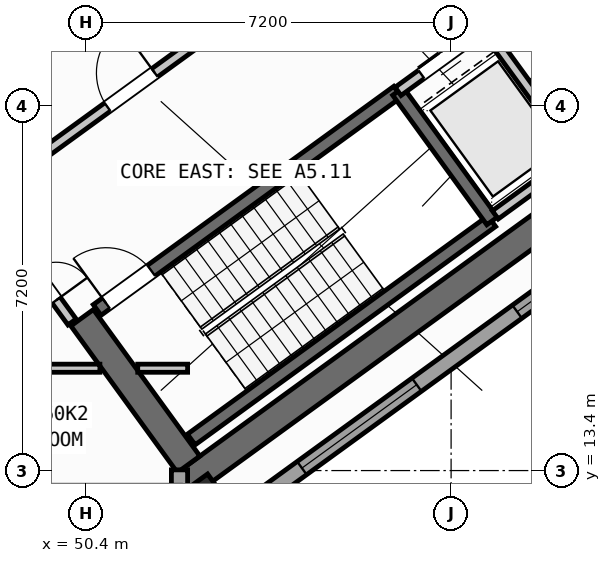
"""IFC4 building model, lengths in metres.
Left out: names, types, materials, properties, quantities, classifications, styles, units other than length and angle.
Written with IfcOpenShell. Run it as: python <this file> out.ifc"""

import sys

from ifc_helpers import new_model, si_unit, direction, frame, frame_2d, origin, origin_2d, place, context, subcontext, project, spatial, rectangle, hollow_rectangle, extrude, source, transform, mapped, element, fill, save


model = new_model("IFC4")
c1 = context("Model", 3, precision=1e-05, world=origin(), true_north=direction((0.0, 1.0)))
c2 = subcontext(c1, "Body", "Model", "MODEL_VIEW")
j1 = project(units=[si_unit("LENGTHUNIT", "METRE"), si_unit("PLANEANGLEUNIT", "RADIAN")], contexts=[c1])
p1 = place(None, origin())
s1 = spatial("IfcSite", under=j1, at=p1, CompositionType="ELEMENT")
p2 = place(p1, origin())
s2 = spatial("IfcBuilding", under=s1, at=p2, CompositionType="ELEMENT")
p3 = place(p2, frame((0.0, 0.0, 199.5)))
s3 = spatial("IfcBuildingStorey", under=s2, at=p3, CompositionType="ELEMENT", Elevation=199.5)
p4 = place(p3, frame((52.359, 13.14, 0.0), z_axis=(0.0, 0.0, 1.0), x_axis=(0.809014896919, 0.587788139183, 0.0)))
e1 = element("IfcWall", 1, at=p4, inside=s3, PredefinedType="SHEAR", context=c2, shape_type="SweptSolid", body=[
    extrude(rectangle(XDim=12.34, YDim=0.55, at=frame_2d((6.17, 0.0))), origin(), (0.0, 0.0, 1.0), 4.25),
])
p5 = place(p3, frame((52.42, 13.524, 0.0), z_axis=(0.0, 0.0, 1.0), x_axis=(-0.587802113096, 0.809004744015, 0.0)))
e2 = element("IfcWall", 2, at=p5, inside=s3, PredefinedType="SHEAR", context=c2, shape_type="SweptSolid", body=[
    extrude(rectangle(XDim=3.575, YDim=0.55, at=frame_2d((1.788, 0.0))), origin(), (0.0, 0.0, 1.0), 4.25),
])
m1 = source(origin(), c2, "Body", "SweptSolid", [
    extrude(hollow_rectangle(XDim=0.8, YDim=0.8, WallThickness=0.032, at=origin_2d()), origin(), (0.0, 0.0, 1.0), 4.5),
])
p6 = place(p3, frame((52.705, 12.773, 0.0), z_axis=(0.0, 0.0, 1.0), x_axis=(0.809016994375, 0.587785252292, 0.0)))
e3 = element("IfcColumn", 3, at=p6, inside=s3, PredefinedType="COLUMN", context=c2, shape_type="MappedRepresentation", body=[
    mapped(m1, transform((0.0, 0.0, 0.0), scale=1.0)),
])
p7 = place(p3, frame((67.454, 22.747, 0.0), z_axis=(0.0, 0.0, 1.0), x_axis=(-0.809021120468, -0.587779573171, 0.0)))
e4 = element("IfcWall", 4, at=p7, inside=s3, PredefinedType="STANDARD", context=c2, shape_type="SweptSolid", body=[
    extrude(rectangle(XDim=17.588, YDim=0.32, at=frame_2d((8.794, 0.0))), origin(), (0.0, 0.0, 1.0), 4.25),
])
p8 = place(p7, frame((1.624, 0.0, 0.0)))
e5 = element("IfcOpeningElement", 5, at=p8, cuts=e4, PredefinedType="OPENING", context=c2, shape_type="SweptSolid", body=[
    extrude(rectangle(XDim=1.05, YDim=2.15, at=frame_2d((0.525, 1.075))), frame((0.0, 0.17, 0.0), z_axis=(0.0, -1.0, 0.0), x_axis=(1.0, 0.0, 0.0)), (0.0, 0.0, 1.0), 0.34),
])
p9 = place(p7, frame((7.769, 0.0, 0.65)))
e6 = element("IfcOpeningElement", 6, at=p9, cuts=e4, PredefinedType="OPENING", context=c2, shape_type="SweptSolid", body=[
    extrude(rectangle(XDim=2.8, YDim=2.1, at=frame_2d((1.4, 1.05))), frame((0.0, 0.17, 0.0), z_axis=(0.0, -1.0, 0.0), x_axis=(1.0, 0.0, 0.0)), (0.0, 0.0, 1.0), 0.34),
])
p10 = place(p7, frame((13.019, 0.0, 0.65)))
e7 = element("IfcOpeningElement", 7, at=p10, cuts=e4, PredefinedType="OPENING", context=c2, shape_type="SweptSolid", body=[
    extrude(rectangle(XDim=2.8, YDim=2.1, at=frame_2d((1.4, 1.05))), frame((0.0, 0.17, 0.0), z_axis=(0.0, -1.0, 0.0), x_axis=(1.0, 0.0, 0.0)), (0.0, 0.0, 1.0), 0.34),
])
p11 = place(p3, frame((52.24, 13.414, 0.0), z_axis=(0.0, 0.0, 1.0), x_axis=(0.0, -1.0, 0.0)))
e8 = element("IfcWall", 8, at=p11, inside=s3, PredefinedType="STANDARD", context=c2, shape_type="SweptSolid", body=[
    extrude(rectangle(XDim=9.948, YDim=0.32, at=frame_2d((4.974, 0.0))), origin(), (0.0, 0.0, 1.0), 4.25),
])
p12 = place(p11, frame((1.917, 0.0, 0.65)))
e9 = element("IfcOpeningElement", 9, at=p12, cuts=e8, PredefinedType="OPENING", context=c2, shape_type="SweptSolid", body=[
    extrude(rectangle(XDim=2.8, YDim=2.1, at=frame_2d((1.4, 1.05))), frame((0.0, 0.17, 0.0), z_axis=(0.0, -1.0, 0.0), x_axis=(1.0, 0.0, 0.0)), (0.0, 0.0, 1.0), 0.34),
])
p13 = place(p11, frame((6.883, 0.0, 0.8)))
e10 = element("IfcOpeningElement", 10, at=p13, cuts=e8, PredefinedType="OPENING", context=c2, shape_type="SweptSolid", body=[
    extrude(rectangle(XDim=2.1, YDim=1.55, at=frame_2d((1.05, 0.775))), frame((0.0, 0.17, 0.0), z_axis=(0.0, -1.0, 0.0), x_axis=(1.0, 0.0, 0.0)), (0.0, 0.0, 1.0), 0.34),
])
p14 = place(p3, frame((52.472, 14.013, 0.0), z_axis=(0.0, 0.0, 1.0), x_axis=(0.809028366311, 0.587769599847, 0.0)))
e11 = element("IfcWall", 11, at=p14, inside=s3, PredefinedType="SHEAR", context=c2, shape_type="SweptSolid", body=[
    extrude(rectangle(XDim=7.33, YDim=0.26, at=frame_2d((3.665, 0.0))), origin(), (0.0, 0.0, 1.0), 4.25),
])
p15 = place(p3, frame((50.615, 16.57, 0.0), z_axis=(0.0, 0.0, 1.0), x_axis=(0.809028366311, 0.587769599847, 0.0)))
e12 = element("IfcWall", 12, at=p15, inside=s3, PredefinedType="SHEAR", context=c2, shape_type="SweptSolid", body=[
    extrude(rectangle(XDim=7.33, YDim=0.26, at=frame_2d((3.665, 0.0))), origin(), (0.0, 0.0, 1.0), 4.25),
])
p16 = place(p15, frame((0.22, 0.0, 0.0)))
e13 = element("IfcOpeningElement", 13, at=p16, cuts=e12, PredefinedType="OPENING", context=c2, shape_type="SweptSolid", body=[
    extrude(rectangle(XDim=1.1, YDim=2.1, at=frame_2d((0.55, 1.05))), frame((0.0, 0.14, 0.0), z_axis=(0.0, -1.0, 0.0), x_axis=(1.0, 0.0, 0.0)), (0.0, 0.0, 1.0), 0.28),
])
p17 = place(p3, frame((58.41, 18.327, 0.0), z_axis=(0.0, 0.0, 1.0), x_axis=(-0.58776738483, 0.809029975545, 0.0)))
e14 = element("IfcWall", 14, at=p17, inside=s3, PredefinedType="SHEAR", context=c2, shape_type="SweptSolid", body=[
    extrude(rectangle(XDim=3.16, YDim=0.26, at=frame_2d((1.58, 0.0))), origin(), (0.0, 0.0, 1.0), 4.25),
])
p18 = place(p3, frame((47.065, 21.407, 0.0), z_axis=(0.0, 0.0, 1.0), x_axis=(0.809032984992, 0.587763242466, 0.0)))
e15 = element("IfcWall", 15, at=p18, inside=s3, PredefinedType="STANDARD", context=c2, shape_type="SweptSolid", body=[
    extrude(rectangle(XDim=3.448, YDim=0.2, at=frame_2d((1.724, 0.0))), origin(), (0.0, 0.0, 1.0), 4.24),
])
p19 = place(p18, frame((0.458, 0.0, 0.0)))
e16 = element("IfcOpeningElement", 16, at=p19, cuts=e15, PredefinedType="OPENING", context=c2, shape_type="SweptSolid", body=[
    extrude(rectangle(XDim=1.3, YDim=2.2, at=frame_2d((0.65, 1.1))), frame((0.0, 0.11, 0.0), z_axis=(0.0, -1.0, 0.0), x_axis=(1.0, 0.0, 0.0)), (0.0, 0.0, 1.0), 0.22),
])
p20 = place(p3, frame((48.758, 19.077, 0.0), z_axis=(0.0, 0.0, 1.0), x_axis=(0.809005065155, 0.587801671104, 0.0)))
e17 = element("IfcWall", 17, at=p20, inside=s3, PredefinedType="STANDARD", context=c2, shape_type="SweptSolid", body=[
    extrude(rectangle(XDim=5.768, YDim=0.2, at=frame_2d((2.884, 0.0))), origin(), (0.0, 0.0, 1.0), 4.24),
])
p21 = place(p20, frame((2.548, 0.0, 0.0)))
e18 = element("IfcOpeningElement", 18, at=p21, cuts=e17, PredefinedType="OPENING", context=c2, shape_type="SweptSolid", body=[
    extrude(rectangle(XDim=1.15, YDim=2.1, at=frame_2d((0.575, 1.05))), frame((0.0, 0.11, 0.0), z_axis=(0.0, -1.0, 0.0), x_axis=(1.0, 0.0, 0.0)), (0.0, 0.0, 1.0), 0.22),
])
p22 = place(p3, frame((56.553, 20.884, 0.0), z_axis=(0.0, 0.0, 1.0), x_axis=(0.809023564264, 0.58777620951, 0.0)))
e19 = element("IfcWall", 19, at=p22, inside=s3, PredefinedType="STANDARD", context=c2, shape_type="SweptSolid", body=[
    extrude(rectangle(XDim=3.818, YDim=0.2, at=frame_2d((1.909, 0.0))), origin(), (0.0, 0.0, 1.0), 4.24),
])
p23 = place(p22, frame((0.57, 0.0, 0.0)))
e20 = element("IfcOpeningElement", 20, at=p23, cuts=e19, PredefinedType="OPENING", context=c2, shape_type="SweptSolid", body=[
    extrude(rectangle(XDim=1.1, YDim=2.15, at=frame_2d((0.55, 1.075))), frame((0.0, 0.11, 0.0), z_axis=(0.0, -1.0, 0.0), x_axis=(1.0, 0.0, 0.0)), (0.0, 0.0, 1.0), 0.22),
])
p24 = place(p22, frame((2.65, 0.0, 0.0)))
e21 = element("IfcOpeningElement", 21, at=p24, cuts=e19, PredefinedType="OPENING", context=c2, shape_type="SweptSolid", body=[
    extrude(rectangle(XDim=0.86, YDim=2.05, at=frame_2d((0.43, 1.025))), frame((0.0, 0.11, 0.0), z_axis=(0.0, -1.0, 0.0), x_axis=(1.0, 0.0, 0.0)), (0.0, 0.0, 1.0), 0.22),
])
p25 = place(p3, frame((60.067, 19.655, 0.0), z_axis=(0.0, 0.0, 1.0), x_axis=(-0.587800520745, 0.809005900975, 0.0)))
e22 = element("IfcWall", 22, at=p25, inside=s3, PredefinedType="STANDARD", context=c2, shape_type="SweptSolid", body=[
    extrude(rectangle(XDim=2.66, YDim=0.2, at=frame_2d((1.33, 0.0))), origin(), (0.0, 0.0, 1.0), 4.24),
])
p26 = place(p3, frame((58.472, 18.447, 0.0), z_axis=(0.0, 0.0, 1.0), x_axis=(0.809018631237, 0.587782999339, 0.0)))
e23 = element("IfcWall", 23, at=p26, inside=s3, PredefinedType="STANDARD", context=c2, shape_type="SweptSolid", body=[
    extrude(rectangle(XDim=3.698, YDim=0.2, at=frame_2d((1.849, 0.0))), origin(), (0.0, 0.0, 1.0), 4.24),
])
p27 = place(p3, frame((35.237, 15.42, 0.0), z_axis=(0.0, 0.0, 1.0), x_axis=(1.0, 0.0, 0.0)))
e24 = element("IfcWall", 24, at=p27, inside=s3, PredefinedType="PARTITIONING", context=c2, shape_type="SweptSolid", body=[
    extrude(rectangle(XDim=15.432, YDim=0.16, at=frame_2d((7.716, 0.0))), origin(), (0.0, 0.0, 1.0), 4.24),
])
p28 = place(p27, frame((0.969, 0.0, 0.0)))
e25 = element("IfcOpeningElement", 25, at=p28, cuts=e24, PredefinedType="OPENING", context=c2, shape_type="SweptSolid", body=[
    extrude(rectangle(XDim=1.0, YDim=2.1, at=frame_2d((0.5, 1.05))), frame((0.0, 0.09, 0.0), z_axis=(0.0, -1.0, 0.0), x_axis=(1.0, 0.0, 0.0)), (0.0, 0.0, 1.0), 0.18),
])
p29 = place(p27, frame((8.799, 0.0, 0.0)))
e26 = element("IfcOpeningElement", 26, at=p29, cuts=e24, PredefinedType="OPENING", context=c2, shape_type="SweptSolid", body=[
    extrude(rectangle(XDim=1.0, YDim=2.1, at=frame_2d((0.5, 1.05))), frame((0.0, 0.09, 0.0), z_axis=(0.0, -1.0, 0.0), x_axis=(1.0, 0.0, 0.0)), (0.0, 0.0, 1.0), 0.18),
])
p30 = place(p3, frame((51.416, 15.42, 0.0), z_axis=(0.0, 0.0, 1.0), x_axis=(1.0, 0.0, 0.0)))
e27 = element("IfcWall", 27, at=p30, inside=s3, PredefinedType="PARTITIONING", context=c2, shape_type="SweptSolid", body=[
    extrude(rectangle(XDim=0.984, YDim=0.16, at=frame_2d((0.492, 0.0))), origin(), (0.0, 0.0, 1.0), 4.24),
])
p31 = place(p3, frame((50.119, 16.333, 0.0), z_axis=(0.0, 0.0, 1.0), x_axis=(-0.587749856981, 0.809042709391, 0.0)))
e28 = element("IfcWall", 28, at=p31, inside=s3, PredefinedType="STANDARD", context=c2, shape_type="SweptSolid", body=[
    extrude(rectangle(XDim=2.96, YDim=0.2, at=frame_2d((1.48, 0.0))), origin(), (0.0, 0.0, 1.0), 4.24),
])
p32 = place(p31, frame((0.53, 0.0, 0.0)))
e29 = element("IfcOpeningElement", 29, at=p32, cuts=e28, PredefinedType="OPENING", context=c2, shape_type="SweptSolid", body=[
    extrude(rectangle(XDim=1.5, YDim=2.15, at=frame_2d((0.75, 1.075))), frame((0.0, 0.11, 0.0), z_axis=(0.0, -1.0, 0.0), x_axis=(1.0, 0.0, 0.0)), (0.0, 0.0, 1.0), 0.22),
])
m2 = source(origin(), c2, "Body", "SweptSolid", [
    extrude(rectangle(XDim=2.8, YDim=2.1, at=frame_2d((1.4, 1.05))), frame((0.0, 0.03, 0.0), z_axis=(0.0, -1.0, 0.0), x_axis=(1.0, 0.0, 0.0)), (0.0, 0.0, 1.0), 0.06),
])
p33 = place(p9, origin())
e30 = element("IfcWindow", 30, at=p33, inside=s3, PartitioningType="SINGLE_PANEL", PredefinedType="WINDOW", context=c2, shape_type="MappedRepresentation", body=[
    mapped(m2, transform((0.0, 0.0, 0.0), scale=1.0)),
])
fill(e6, e30)
p34 = place(p10, origin())
e31 = element("IfcWindow", 31, at=p34, inside=s3, PartitioningType="SINGLE_PANEL", PredefinedType="WINDOW", context=c2, shape_type="MappedRepresentation", body=[
    mapped(m2, transform((0.0, 0.0, 0.0), scale=1.0)),
])
fill(e7, e31)
m3 = source(origin(), c2, "Body", "SweptSolid", [
    extrude(rectangle(XDim=1.1, YDim=2.1, at=frame_2d((0.55, 1.05))), frame((0.0, 0.025, 0.0), z_axis=(0.0, -1.0, 0.0), x_axis=(1.0, 0.0, 0.0)), (0.0, 0.0, 1.0), 0.05),
])
p35 = place(p16, origin())
e32 = element("IfcDoor", 32, at=p35, inside=s3, OperationType="SINGLE_SWING_LEFT", PredefinedType="DOOR", context=c2, shape_type="MappedRepresentation", body=[
    mapped(m3, transform((0.0, 0.0, 0.0), scale=1.0)),
])
fill(e13, e32)
m4 = source(origin(), c2, "Body", "SweptSolid", [
    extrude(rectangle(XDim=1.15, YDim=2.1, at=frame_2d((0.575, 1.05))), frame((0.0, 0.025, 0.0), z_axis=(0.0, -1.0, 0.0), x_axis=(1.0, 0.0, 0.0)), (0.0, 0.0, 1.0), 0.05),
])
p36 = place(p21, origin())
e33 = element("IfcDoor", 33, at=p36, inside=s3, OperationType="SINGLE_SWING_RIGHT", PredefinedType="DOOR", context=c2, shape_type="MappedRepresentation", body=[
    mapped(m4, transform((0.0, 0.0, 0.0), scale=1.0)),
])
fill(e18, e33)
m5 = source(origin(), c2, "Body", "SweptSolid", [
    extrude(rectangle(XDim=1.1, YDim=2.15, at=frame_2d((0.55, 1.075))), frame((0.0, 0.025, 0.0), z_axis=(0.0, -1.0, 0.0), x_axis=(1.0, 0.0, 0.0)), (0.0, 0.0, 1.0), 0.05),
])
p37 = place(p23, origin())
e34 = element("IfcDoor", 34, at=p37, inside=s3, OperationType="DOUBLE_DOOR_SLIDING", PredefinedType="DOOR", context=c2, shape_type="MappedRepresentation", body=[
    mapped(m5, transform((0.0, 0.0, 0.0), scale=1.0)),
])
fill(e20, e34)
m6 = source(origin(), c2, "Body", "SweptSolid", [
    extrude(rectangle(XDim=1.5, YDim=2.15, at=frame_2d((0.75, 1.075))), frame((0.0, 0.025, 0.0), z_axis=(0.0, -1.0, 0.0), x_axis=(1.0, 0.0, 0.0)), (0.0, 0.0, 1.0), 0.05),
])
p38 = place(p32, frame((1.5, 0.0, 0.0), z_axis=(0.0, 0.0, 1.0), x_axis=(-1.0, 0.0, 0.0)))
e35 = element("IfcDoor", 35, at=p38, inside=s3, OperationType="DOUBLE_DOOR_SINGLE_SWING", PredefinedType="DOOR", context=c2, shape_type="MappedRepresentation", body=[
    mapped(m6, transform((0.0, 0.0, 0.0), scale=1.0)),
])
fill(e29, e35)
save(model, sys.argv[1])
